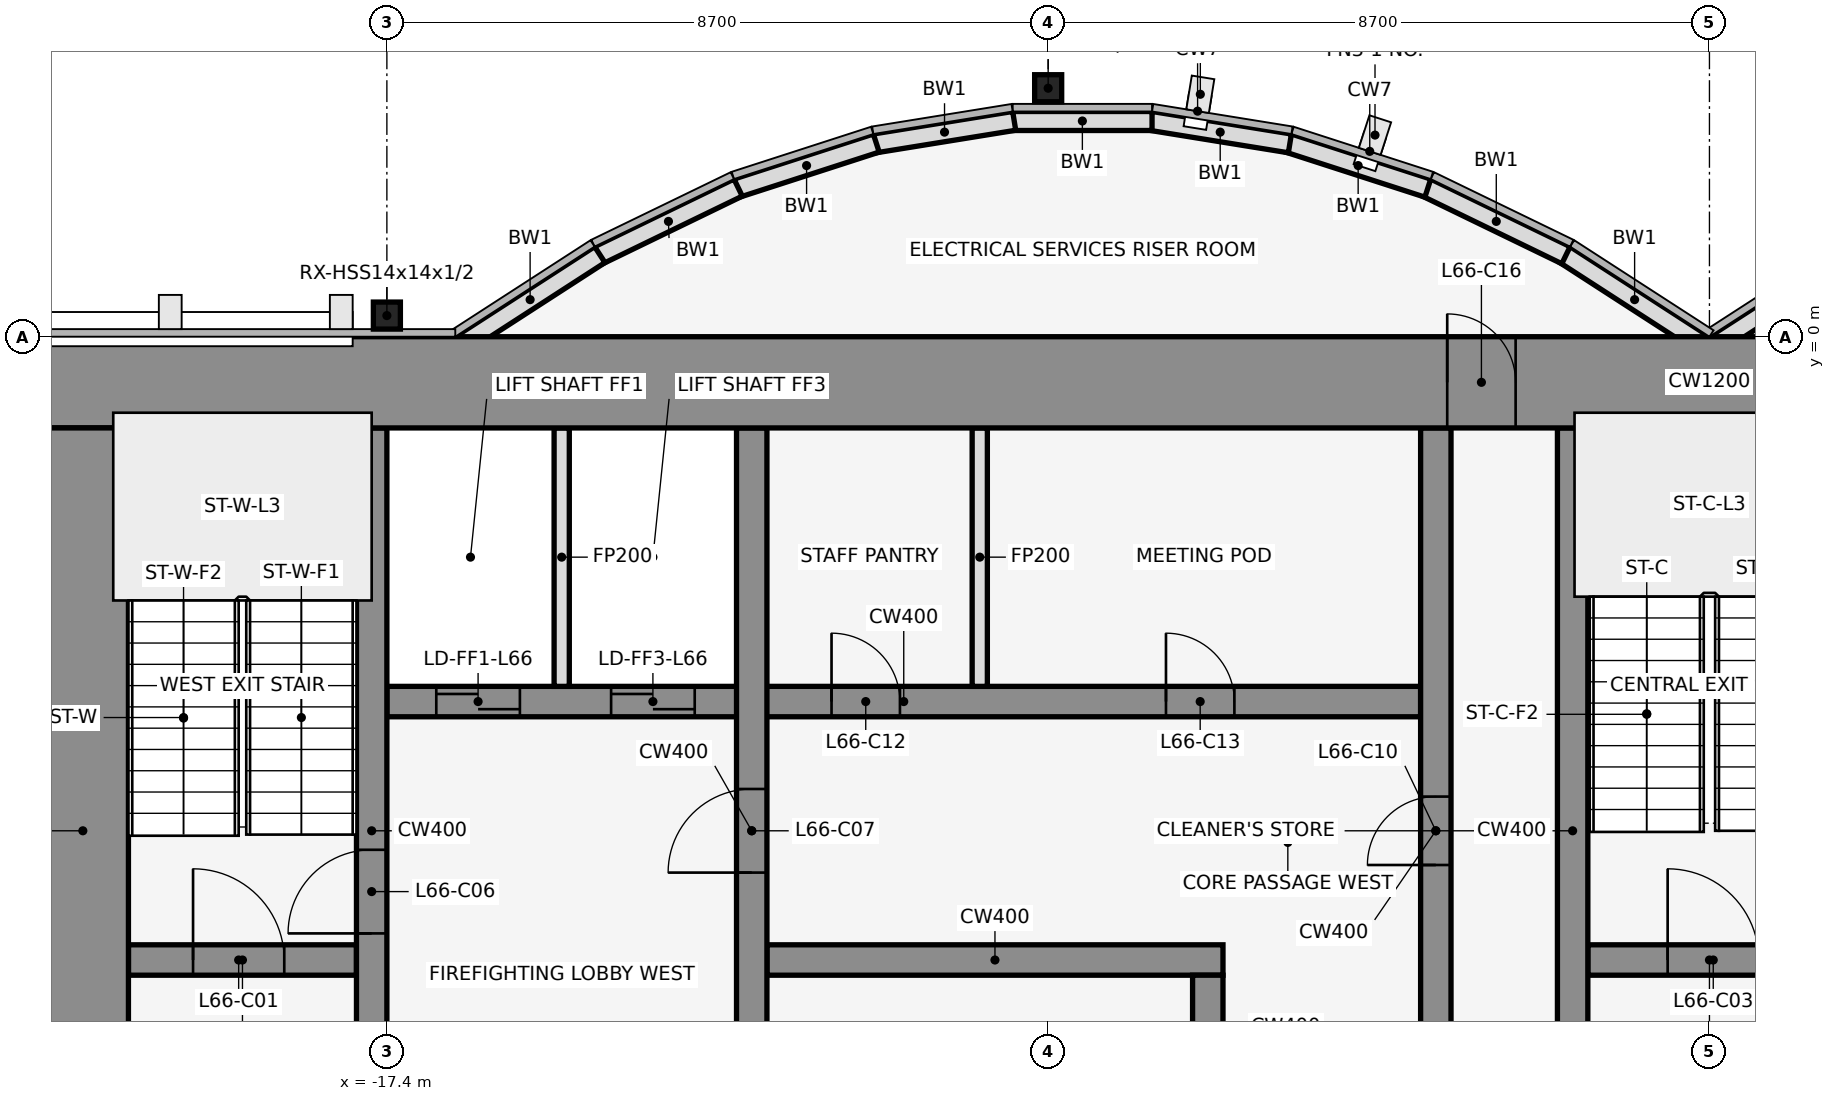
"""IFC4 building model, lengths in metres.
Left out: names, types, materials, properties, quantities, classifications, styles, units other than length and angle.
Written with IfcOpenShell. Run it as: python <this file> out.ifc"""

import sys

from ifc_helpers import new_model, si_unit, direction, frame, frame_2d, origin, origin_2d, place, context, subcontext, project, spatial, rectangle, hollow_rectangle, extrude, element, fill, save


model = new_model("IFC4")
c1 = context("Model", 3, precision=1e-05, world=origin(), true_north=direction((0.0, 1.0)))
c2 = subcontext(c1, "Body", "Model", "MODEL_VIEW")
j1 = project(units=[si_unit("LENGTHUNIT", "METRE"), si_unit("PLANEANGLEUNIT", "RADIAN")], contexts=[c1])
p1 = place(None, origin())
s1 = spatial("IfcSite", under=j1, at=p1, CompositionType="ELEMENT")
p2 = place(p1, origin())
s2 = spatial("IfcBuilding", under=s1, at=p2, CompositionType="ELEMENT")
p3 = place(p2, frame((0.0, 0.0, 293.0)))
s3 = spatial("IfcBuildingStorey", under=s2, at=p3, CompositionType="ELEMENT", Elevation=293.0)
for number, where, z_axis, x_axis in (
    (1, (-8.7, 3.269, 0.0), (0.0, 0.0, 1.0), (1.0, 0.0, 0.0)),
    (2, (-17.4, 0.278, 0.0), (0.0, 0.0, 1.0), (1.0, 0.0, 0.0)),
):
    element("IfcColumn", number, at=place(p3, frame(where, z_axis=z_axis, x_axis=x_axis)), inside=s3, PredefinedType="COLUMN", context=c2, shape_type="SweptSolid", body=[
        extrude(hollow_rectangle(XDim=0.356, YDim=0.356, WallThickness=0.012, at=origin_2d()), origin(), (0.0, 0.0, 1.0), 4.5),
    ])
for number, where, z_axis, x_axis in (
    (3, (1.901, 1.08, 0.0), (0.0, 0.0, 1.0), (-0.84, -0.543, 0.0)),
    (4, (-0.068, -0.105, 0.0), (0.0, 0.0, 1.0), (-0.84, 0.543, 0.0)),
):
    element("IfcWall", number, at=place(p3, frame(where, z_axis=z_axis, x_axis=x_axis)), inside=s3, PredefinedType="STANDARD", context=c2, shape_type="SweptSolid", body=[
        extrude(rectangle(XDim=2.183, YDim=0.25, at=frame_2d((1.091, 0.0))), origin(), (0.0, 0.0, 1.0), 4.35),
    ])
p4 = place(p3, frame((-1.888, 1.073, 0.0), z_axis=(0.0, 0.0, 1.0), x_axis=(-0.89982408427, 0.436252928206, 0.0)))
e5 = element("IfcWall", 5, at=p4, inside=s3, PredefinedType="STANDARD", context=c2, shape_type="SweptSolid", body=[
    extrude(rectangle(XDim=2.038, YDim=0.25, at=frame_2d((1.019, 0.0))), origin(), (0.0, 0.0, 1.0), 4.35),
])
p5 = place(p3, frame((-3.705, 1.955, 0.0), z_axis=(0.0, 0.0, 1.0), x_axis=(-0.951495806175, 0.307661714928, 0.0)))
e6 = element("IfcWall", 6, at=p5, inside=s3, PredefinedType="STANDARD", context=c2, shape_type="SweptSolid", body=[
    extrude(rectangle(XDim=1.927, YDim=0.25, at=frame_2d((0.963, 0.0))), origin(), (0.0, 0.0, 1.0), 4.35),
])
p6 = place(p3, frame((-5.52, 2.543, 0.0), z_axis=(0.0, 0.0, 1.0), x_axis=(-0.987181718931, 0.159600293885, 0.0)))
e7 = element("IfcWall", 7, at=p6, inside=s3, PredefinedType="STANDARD", context=c2, shape_type="SweptSolid", body=[
    extrude(rectangle(XDim=1.857, YDim=0.25, at=frame_2d((0.929, 0.0))), origin(), (0.0, 0.0, 1.0), 4.35),
])
p7 = place(p3, frame((-7.333, 2.838, 0.0), z_axis=(0.0, 0.0, 1.0), x_axis=(-1.0, 0.0, 0.0)))
e8 = element("IfcWall", 8, at=p7, inside=s3, PredefinedType="STANDARD", context=c2, shape_type="SweptSolid", body=[
    extrude(rectangle(XDim=1.833, YDim=0.25, at=frame_2d((0.917, 0.0))), origin(), (0.0, 0.0, 1.0), 4.35),
])
p8 = place(p3, frame((-9.147, 2.84, 0.0), z_axis=(0.0, 0.0, 1.0), x_axis=(-0.987181718931, -0.159600293885, 0.0)))
e9 = element("IfcWall", 9, at=p8, inside=s3, PredefinedType="STANDARD", context=c2, shape_type="SweptSolid", body=[
    extrude(rectangle(XDim=1.857, YDim=0.25, at=frame_2d((0.929, 0.0))), origin(), (0.0, 0.0, 1.0), 4.35),
])
p9 = place(p3, frame((-10.962, 2.548, 0.0), z_axis=(0.0, 0.0, 1.0), x_axis=(-0.951495806175, -0.307661714928, 0.0)))
e10 = element("IfcWall", 10, at=p9, inside=s3, PredefinedType="STANDARD", context=c2, shape_type="SweptSolid", body=[
    extrude(rectangle(XDim=1.927, YDim=0.25, at=frame_2d((0.963, 0.0))), origin(), (0.0, 0.0, 1.0), 4.35),
])
p10 = place(p3, frame((-12.779, 1.962, 0.0), z_axis=(0.0, 0.0, 1.0), x_axis=(-0.89982408427, -0.436252928206, 0.0)))
e11 = element("IfcWall", 11, at=p10, inside=s3, PredefinedType="STANDARD", context=c2, shape_type="SweptSolid", body=[
    extrude(rectangle(XDim=2.038, YDim=0.25, at=frame_2d((1.019, 0.0))), origin(), (0.0, 0.0, 1.0), 4.35),
])
p11 = place(p3, frame((-14.599, 1.08, 0.0), z_axis=(0.0, 0.0, 1.0), x_axis=(-0.83981312244, -0.542875602121, 0.0)))
e12 = element("IfcWall", 12, at=p11, inside=s3, PredefinedType="STANDARD", context=c2, shape_type="SweptSolid", body=[
    extrude(rectangle(XDim=2.183, YDim=0.25, at=frame_2d((1.091, 0.0))), origin(), (0.0, 0.0, 1.0), 4.35),
])
p12 = place(p3, frame((-20.8, -8.2, 0.0), z_axis=(0.0, 0.0, 1.0), x_axis=(1.0, 0.0, 0.0)))
e13 = element("IfcWall", 13, at=p12, inside=s3, PredefinedType="SHEAR", context=c2, shape_type="SweptSolid", body=[
    extrude(rectangle(XDim=3.0, YDim=0.4, at=frame_2d((1.5, 0.0))), origin(), (0.0, 0.0, 1.0), 4.5),
])
p13 = place(p12, frame((0.85, 0.0, 0.0)))
e14 = element("IfcOpeningElement", 14, at=p13, cuts=e13, PredefinedType="OPENING", context=c2, shape_type="SweptSolid", body=[
    extrude(rectangle(XDim=1.2, YDim=2.1, at=frame_2d((0.6, 1.05))), frame((0.0, 0.212, 0.0), z_axis=(0.0, -1.0, 0.0), x_axis=(1.0, 0.0, 0.0)), (0.0, 0.0, 1.0), 0.424),
])
p14 = place(p3, frame((-12.4, -8.2, 0.0), z_axis=(0.0, 0.0, 1.0), x_axis=(1.0, 0.0, 0.0)))
e15 = element("IfcWall", 15, at=p14, inside=s3, PredefinedType="SHEAR", context=c2, shape_type="SweptSolid", body=[
    extrude(rectangle(XDim=6.0, YDim=0.4, at=frame_2d((3.0, 0.0))), origin(), (0.0, 0.0, 1.0), 4.5),
])
p15 = place(p3, frame((-1.6, -8.2, 0.0), z_axis=(0.0, 0.0, 1.0), x_axis=(1.0, 0.0, 0.0)))
e16 = element("IfcWall", 16, at=p15, inside=s3, PredefinedType="SHEAR", context=c2, shape_type="SweptSolid", body=[
    extrude(rectangle(XDim=3.2, YDim=0.4, at=frame_2d((1.6, 0.0))), origin(), (0.0, 0.0, 1.0), 4.5),
])
p16 = place(p15, frame((1.05, 0.0, 0.0)))
e17 = element("IfcOpeningElement", 17, at=p16, cuts=e16, PredefinedType="OPENING", context=c2, shape_type="SweptSolid", body=[
    extrude(rectangle(XDim=1.2, YDim=2.1, at=frame_2d((0.6, 1.05))), frame((0.0, 0.212, 0.0), z_axis=(0.0, -1.0, 0.0), x_axis=(1.0, 0.0, 0.0)), (0.0, 0.0, 1.0), 0.424),
])
p17 = place(p3, frame((-17.4, -4.8, 0.0), z_axis=(0.0, 0.0, 1.0), x_axis=(1.0, 0.0, 0.0)))
e18 = element("IfcWall", 18, at=p17, inside=s3, PredefinedType="SHEAR", context=c2, shape_type="SweptSolid", body=[
    extrude(rectangle(XDim=13.6, YDim=0.4, at=frame_2d((6.8, 0.0))), origin(), (0.0, 0.0, 1.0), 4.5),
])
p18 = place(p17, frame((0.65, 0.0, 0.0)))
e19 = element("IfcOpeningElement", 19, at=p18, cuts=e18, PredefinedType="OPENING", context=c2, shape_type="SweptSolid", body=[
    extrude(rectangle(XDim=1.1, YDim=2.1, at=frame_2d((0.55, 1.05))), frame((0.0, 0.212, 0.0), z_axis=(0.0, -1.0, 0.0), x_axis=(1.0, 0.0, 0.0)), (0.0, 0.0, 1.0), 0.424),
])
p19 = place(p17, frame((2.95, 0.0, 0.0)))
e20 = element("IfcOpeningElement", 20, at=p19, cuts=e18, PredefinedType="OPENING", context=c2, shape_type="SweptSolid", body=[
    extrude(rectangle(XDim=1.1, YDim=2.1, at=frame_2d((0.55, 1.05))), frame((0.0, 0.212, 0.0), z_axis=(0.0, -1.0, 0.0), x_axis=(1.0, 0.0, 0.0)), (0.0, 0.0, 1.0), 0.424),
])
p20 = place(p17, frame((5.85, 0.0, 0.0)))
e21 = element("IfcOpeningElement", 21, at=p20, cuts=e18, PredefinedType="OPENING", context=c2, shape_type="SweptSolid", body=[
    extrude(rectangle(XDim=0.9, YDim=2.1, at=frame_2d((0.45, 1.05))), frame((0.0, 0.212, 0.0), z_axis=(0.0, -1.0, 0.0), x_axis=(1.0, 0.0, 0.0)), (0.0, 0.0, 1.0), 0.424),
])
p21 = place(p17, frame((10.25, 0.0, 0.0)))
e22 = element("IfcOpeningElement", 22, at=p21, cuts=e18, PredefinedType="OPENING", context=c2, shape_type="SweptSolid", body=[
    extrude(rectangle(XDim=0.9, YDim=2.1, at=frame_2d((0.45, 1.05))), frame((0.0, 0.212, 0.0), z_axis=(0.0, -1.0, 0.0), x_axis=(1.0, 0.0, 0.0)), (0.0, 0.0, 1.0), 0.424),
])
p22 = place(p3, frame((-17.6, -11.8, 0.0), z_axis=(0.0, 0.0, 1.0), x_axis=(0.0, 1.0, 0.0)))
e23 = element("IfcWall", 23, at=p22, inside=s3, PredefinedType="SHEAR", context=c2, shape_type="SweptSolid", body=[
    extrude(rectangle(XDim=10.6, YDim=0.4, at=frame_2d((5.3, 0.0))), origin(), (0.0, 0.0, 1.0), 4.5),
])
p23 = place(p22, frame((1.25, 0.0, 0.0)))
e24 = element("IfcOpeningElement", 24, at=p23, cuts=e23, PredefinedType="OPENING", context=c2, shape_type="SweptSolid", body=[
    extrude(rectangle(XDim=1.1, YDim=2.1, at=frame_2d((0.55, 1.05))), frame((0.0, 0.212, 0.0), z_axis=(0.0, -1.0, 0.0), x_axis=(1.0, 0.0, 0.0)), (0.0, 0.0, 1.0), 0.424),
])
p24 = place(p22, frame((3.95, 0.0, 0.0)))
e25 = element("IfcOpeningElement", 25, at=p24, cuts=e23, PredefinedType="OPENING", context=c2, shape_type="SweptSolid", body=[
    extrude(rectangle(XDim=1.1, YDim=2.1, at=frame_2d((0.55, 1.05))), frame((0.0, 0.212, 0.0), z_axis=(0.0, -1.0, 0.0), x_axis=(1.0, 0.0, 0.0)), (0.0, 0.0, 1.0), 0.424),
])
p25 = place(p3, frame((-15.1, -4.6, 0.0), z_axis=(0.0, 0.0, 1.0), x_axis=(0.0, 1.0, 0.0)))
e26 = element("IfcWall", 26, at=p25, inside=s3, PredefinedType="PARTITIONING", context=c2, shape_type="SweptSolid", body=[
    extrude(rectangle(XDim=3.4, YDim=0.2, at=frame_2d((1.7, 0.0))), origin(), (0.0, 0.0, 1.0), 3.418),
])
p26 = place(p3, frame((-12.6, -11.8, 0.0), z_axis=(0.0, 0.0, 1.0), x_axis=(0.0, 1.0, 0.0)))
e27 = element("IfcWall", 27, at=p26, inside=s3, PredefinedType="SHEAR", context=c2, shape_type="SweptSolid", body=[
    extrude(rectangle(XDim=10.6, YDim=0.4, at=frame_2d((5.3, 0.0))), origin(), (0.0, 0.0, 1.0), 4.5),
])
p27 = place(p26, frame((4.75, 0.0, 0.0)))
e28 = element("IfcOpeningElement", 28, at=p27, cuts=e27, PredefinedType="OPENING", context=c2, shape_type="SweptSolid", body=[
    extrude(rectangle(XDim=1.1, YDim=2.1, at=frame_2d((0.55, 1.05))), frame((0.0, 0.212, 0.0), z_axis=(0.0, -1.0, 0.0), x_axis=(1.0, 0.0, 0.0)), (0.0, 0.0, 1.0), 0.424),
])
p28 = place(p3, frame((-9.6, -4.6, 0.0), z_axis=(0.0, 0.0, 1.0), x_axis=(0.0, 1.0, 0.0)))
e29 = element("IfcWall", 29, at=p28, inside=s3, PredefinedType="PARTITIONING", context=c2, shape_type="SweptSolid", body=[
    extrude(rectangle(XDim=3.4, YDim=0.2, at=frame_2d((1.7, 0.0))), origin(), (0.0, 0.0, 1.0), 3.418),
])
p29 = place(p3, frame((-6.6, -11.8, 0.0), z_axis=(0.0, 0.0, 1.0), x_axis=(0.0, 1.0, 0.0)))
e30 = element("IfcWall", 30, at=p29, inside=s3, PredefinedType="SHEAR", context=c2, shape_type="SweptSolid", body=[
    extrude(rectangle(XDim=3.4, YDim=0.4, at=frame_2d((1.7, 0.0))), origin(), (0.0, 0.0, 1.0), 4.5),
])
p30 = place(p29, frame((1.25, 0.0, 0.0)))
e31 = element("IfcOpeningElement", 31, at=p30, cuts=e30, PredefinedType="OPENING", context=c2, shape_type="SweptSolid", body=[
    extrude(rectangle(XDim=0.9, YDim=2.1, at=frame_2d((0.45, 1.05))), frame((0.0, 0.212, 0.0), z_axis=(0.0, -1.0, 0.0), x_axis=(1.0, 0.0, 0.0)), (0.0, 0.0, 1.0), 0.424),
])
p31 = place(p3, frame((-3.6, -11.8, 0.0), z_axis=(0.0, 0.0, 1.0), x_axis=(0.0, 1.0, 0.0)))
e32 = element("IfcWall", 32, at=p31, inside=s3, PredefinedType="SHEAR", context=c2, shape_type="SweptSolid", body=[
    extrude(rectangle(XDim=10.6, YDim=0.4, at=frame_2d((5.3, 0.0))), origin(), (0.0, 0.0, 1.0), 4.5),
])
p32 = place(p31, frame((4.85, 0.0, 0.0)))
e33 = element("IfcOpeningElement", 33, at=p32, cuts=e32, PredefinedType="OPENING", context=c2, shape_type="SweptSolid", body=[
    extrude(rectangle(XDim=0.9, YDim=2.1, at=frame_2d((0.45, 1.05))), frame((0.0, 0.212, 0.0), z_axis=(0.0, -1.0, 0.0), x_axis=(1.0, 0.0, 0.0)), (0.0, 0.0, 1.0), 0.424),
])
p33 = place(p3, frame((-1.8, -11.8, 0.0), z_axis=(0.0, 0.0, 1.0), x_axis=(0.0, 1.0, 0.0)))
e34 = element("IfcWall", 34, at=p33, inside=s3, PredefinedType="SHEAR", context=c2, shape_type="SweptSolid", body=[
    extrude(rectangle(XDim=10.6, YDim=0.4, at=frame_2d((5.3, 0.0))), origin(), (0.0, 0.0, 1.0), 4.5),
])
p34 = place(p3, frame((-22.0, -0.6, 0.0), z_axis=(0.0, 0.0, 1.0), x_axis=(1.0, 0.0, 0.0)))
e35 = element("IfcWall", 35, at=p34, inside=s3, PredefinedType="SHEAR", context=c2, shape_type="SweptSolid", body=[
    extrude(rectangle(XDim=44.0, YDim=1.2, at=frame_2d((22.0, 0.0))), origin(), (0.0, 0.0, 1.0), 4.5),
])
p35 = place(p34, frame((18.55, 0.0, 0.0)))
e36 = element("IfcOpeningElement", 36, at=p35, cuts=e35, PredefinedType="OPENING", context=c2, shape_type="SweptSolid", body=[
    extrude(rectangle(XDim=0.9, YDim=2.1, at=frame_2d((0.45, 1.05))), frame((0.0, 0.612, 0.0), z_axis=(0.0, -1.0, 0.0), x_axis=(1.0, 0.0, 0.0)), (0.0, 0.0, 1.0), 1.224),
])
p36 = place(p34, frame((24.55, 0.0, 0.0)))
e37 = element("IfcOpeningElement", 37, at=p36, cuts=e35, PredefinedType="OPENING", context=c2, shape_type="SweptSolid", body=[
    extrude(rectangle(XDim=0.9, YDim=2.1, at=frame_2d((0.45, 1.05))), frame((0.0, 0.612, 0.0), z_axis=(0.0, -1.0, 0.0), x_axis=(1.0, 0.0, 0.0)), (0.0, 0.0, 1.0), 1.224),
])
p37 = place(p3, frame((-21.4, -11.8, 0.0), z_axis=(0.0, 0.0, 1.0), x_axis=(0.0, 1.0, 0.0)))
e38 = element("IfcWall", 38, at=p37, inside=s3, PredefinedType="SHEAR", context=c2, shape_type="SweptSolid", body=[
    extrude(rectangle(XDim=10.6, YDim=1.2, at=frame_2d((5.3, 0.0))), origin(), (0.0, 0.0, 1.0), 4.5),
])
p38 = place(p13, origin())
e39 = element("IfcDoor", 39, at=p38, inside=s3, OperationType="SINGLE_SWING_LEFT", PredefinedType="DOOR", context=c2, shape_type="SweptSolid", body=[
    extrude(rectangle(XDim=1.2, YDim=2.1, at=frame_2d((0.6, 1.05))), frame((0.0, 0.025, 0.0), z_axis=(0.0, -1.0, 0.0), x_axis=(1.0, 0.0, 0.0)), (0.0, 0.0, 1.0), 0.05),
])
fill(e14, e39)
p39 = place(p16, origin())
e40 = element("IfcDoor", 40, at=p39, inside=s3, OperationType="SINGLE_SWING_LEFT", PredefinedType="DOOR", context=c2, shape_type="SweptSolid", body=[
    extrude(rectangle(XDim=1.2, YDim=2.1, at=frame_2d((0.6, 1.05))), frame((0.0, 0.025, 0.0), z_axis=(0.0, -1.0, 0.0), x_axis=(1.0, 0.0, 0.0)), (0.0, 0.0, 1.0), 0.05),
])
fill(e17, e40)
p40 = place(p18, origin())
e41 = element("IfcDoor", 41, at=p40, inside=s3, OperationType="DOUBLE_DOOR_SLIDING", PredefinedType="DOOR", context=c2, shape_type="SweptSolid", body=[
    extrude(rectangle(XDim=1.1, YDim=2.1, at=frame_2d((0.55, 1.05))), frame((0.0, 0.025, 0.0), z_axis=(0.0, -1.0, 0.0), x_axis=(1.0, 0.0, 0.0)), (0.0, 0.0, 1.0), 0.05),
])
fill(e19, e41)
p41 = place(p19, origin())
e42 = element("IfcDoor", 42, at=p41, inside=s3, OperationType="DOUBLE_DOOR_SLIDING", PredefinedType="DOOR", context=c2, shape_type="SweptSolid", body=[
    extrude(rectangle(XDim=1.1, YDim=2.1, at=frame_2d((0.55, 1.05))), frame((0.0, 0.025, 0.0), z_axis=(0.0, -1.0, 0.0), x_axis=(1.0, 0.0, 0.0)), (0.0, 0.0, 1.0), 0.05),
])
fill(e20, e42)
p42 = place(p24, frame((1.1, 0.0, 0.0), z_axis=(0.0, 0.0, 1.0), x_axis=(-1.0, 0.0, 0.0)))
e43 = element("IfcDoor", 43, at=p42, inside=s3, OperationType="SINGLE_SWING_LEFT", PredefinedType="DOOR", context=c2, shape_type="SweptSolid", body=[
    extrude(rectangle(XDim=1.1, YDim=2.1, at=frame_2d((0.55, 1.05))), frame((0.0, 0.025, 0.0), z_axis=(0.0, -1.0, 0.0), x_axis=(1.0, 0.0, 0.0)), (0.0, 0.0, 1.0), 0.05),
])
fill(e25, e43)
p43 = place(p27, origin())
e44 = element("IfcDoor", 44, at=p43, inside=s3, OperationType="SINGLE_SWING_LEFT", PredefinedType="DOOR", context=c2, shape_type="SweptSolid", body=[
    extrude(rectangle(XDim=1.1, YDim=2.1, at=frame_2d((0.55, 1.05))), frame((0.0, 0.025, 0.0), z_axis=(0.0, -1.0, 0.0), x_axis=(1.0, 0.0, 0.0)), (0.0, 0.0, 1.0), 0.05),
])
fill(e28, e44)
p44 = place(p32, frame((0.9, 0.0, 0.0), z_axis=(0.0, 0.0, 1.0), x_axis=(-1.0, 0.0, 0.0)))
e45 = element("IfcDoor", 45, at=p44, inside=s3, OperationType="SINGLE_SWING_LEFT", PredefinedType="DOOR", context=c2, shape_type="SweptSolid", body=[
    extrude(rectangle(XDim=0.9, YDim=2.1, at=frame_2d((0.45, 1.05))), frame((0.0, 0.025, 0.0), z_axis=(0.0, -1.0, 0.0), x_axis=(1.0, 0.0, 0.0)), (0.0, 0.0, 1.0), 0.05),
])
fill(e33, e45)
p45 = place(p20, origin())
e46 = element("IfcDoor", 46, at=p45, inside=s3, OperationType="SINGLE_SWING_RIGHT", PredefinedType="DOOR", context=c2, shape_type="SweptSolid", body=[
    extrude(rectangle(XDim=0.9, YDim=2.1, at=frame_2d((0.45, 1.05))), frame((0.0, 0.025, 0.0), z_axis=(0.0, -1.0, 0.0), x_axis=(1.0, 0.0, 0.0)), (0.0, 0.0, 1.0), 0.05),
])
fill(e21, e46)
p46 = place(p21, origin())
e47 = element("IfcDoor", 47, at=p46, inside=s3, OperationType="SINGLE_SWING_LEFT", PredefinedType="DOOR", context=c2, shape_type="SweptSolid", body=[
    extrude(rectangle(XDim=0.9, YDim=2.1, at=frame_2d((0.45, 1.05))), frame((0.0, 0.025, 0.0), z_axis=(0.0, -1.0, 0.0), x_axis=(1.0, 0.0, 0.0)), (0.0, 0.0, 1.0), 0.05),
])
fill(e22, e47)
p47 = place(p35, origin())
e48 = element("IfcDoor", 48, at=p47, inside=s3, OperationType="SINGLE_SWING_LEFT", PredefinedType="DOOR", context=c2, shape_type="SweptSolid", body=[
    extrude(rectangle(XDim=0.9, YDim=2.1, at=frame_2d((0.45, 1.05))), frame((0.0, 0.025, 0.0), z_axis=(0.0, -1.0, 0.0), x_axis=(1.0, 0.0, 0.0)), (0.0, 0.0, 1.0), 0.05),
])
fill(e36, e48)
save(model, sys.argv[1])
